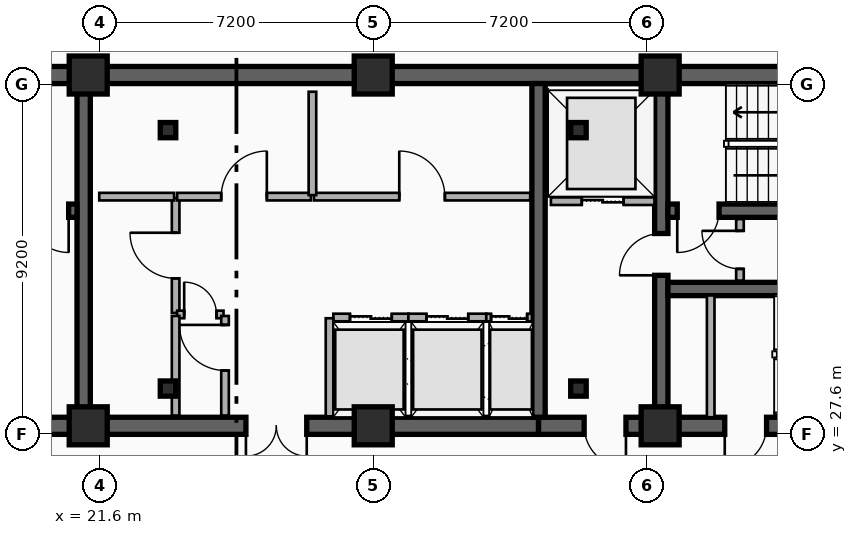
"""IFC4 building model, lengths in metres.
Left out: names, types, materials, properties, quantities, classifications, styles, units other than length and angle.
Written with IfcOpenShell. Run it as: python <this file> out.ifc"""

import sys

from ifc_helpers import new_model, si_unit, direction, frame, frame_2d, origin, origin_2d, place, context, subcontext, project, spatial, rectangle, i_section, extrude, element, fill, save


model = new_model("IFC4")
c1 = context("Model", 3, precision=1e-05, world=origin(), true_north=direction((0.0, 1.0)))
c2 = subcontext(c1, "Body", "Model", "MODEL_VIEW")
j1 = project(units=[si_unit("LENGTHUNIT", "METRE"), si_unit("PLANEANGLEUNIT", "RADIAN")], contexts=[c1])
p1 = place(None, origin())
s1 = spatial("IfcSite", under=j1, at=p1, CompositionType="ELEMENT")
p2 = place(p1, origin())
s2 = spatial("IfcBuilding", under=s1, at=p2, CompositionType="ELEMENT")
p3 = place(p2, frame((0.0, 0.0, 229.2)))
s3 = spatial("IfcBuildingStorey", under=s2, at=p3, CompositionType="ELEMENT", Elevation=229.2)
p4 = place(p3, frame((12.15, 37.05, 0.0), z_axis=(0.0, 0.0, 1.0), x_axis=(1.0, 0.0, 0.0)))
e1 = element("IfcWall", 1, at=p4, inside=s3, PredefinedType="SHEAR", context=c2, shape_type="SweptSolid", body=[
    extrude(rectangle(XDim=33.23, YDim=0.45, at=frame_2d((16.615, 0.0))), origin(), (0.0, 0.0, 1.0), 3.6),
])
p5 = place(p3, frame((21.18, 27.82, 0.0), z_axis=(0.0, 0.0, 1.0), x_axis=(-1.0, 0.0, 0.0)))
e2 = element("IfcWall", 2, at=p5, inside=s3, PredefinedType="SHEAR", context=c2, shape_type="SweptSolid", body=[
    extrude(rectangle(XDim=9.03, YDim=0.45, at=frame_2d((4.515, 0.0))), origin(), (0.0, 0.0, 1.0), 3.6),
])
p6 = place(p5, frame((2.68, 0.0, 0.0)))
e3 = element("IfcOpeningElement", 3, at=p6, cuts=e2, PredefinedType="OPENING", context=c2, shape_type="SweptSolid", body=[
    extrude(rectangle(XDim=1.1, YDim=2.15, at=frame_2d((0.55, 1.075))), frame((0.0, 0.235, 0.0), z_axis=(0.0, -1.0, 0.0), x_axis=(1.0, 0.0, 0.0)), (0.0, 0.0, 1.0), 0.47),
])
p7 = place(p3, frame((33.15, 27.82, 0.0), z_axis=(0.0, 0.0, 1.0), x_axis=(-1.0, 0.0, 0.0)))
e4 = element("IfcWall", 4, at=p7, inside=s3, PredefinedType="SHEAR", context=c2, shape_type="SweptSolid", body=[
    extrude(rectangle(XDim=11.97, YDim=0.45, at=frame_2d((5.985, 0.0))), origin(), (0.0, 0.0, 1.0), 3.6),
])
p8 = place(p7, frame((6.1, 0.0, 0.0)))
e5 = element("IfcOpeningElement", 5, at=p8, cuts=e4, PredefinedType="OPENING", context=c2, shape_type="SweptSolid", body=[
    extrude(rectangle(XDim=1.6, YDim=2.2, at=frame_2d((0.8, 1.1))), frame((0.0, 0.235, 0.0), z_axis=(0.0, -1.0, 0.0), x_axis=(1.0, 0.0, 0.0)), (0.0, 0.0, 1.0), 0.47),
])
p9 = place(p3, frame((45.38, 27.82, 0.0), z_axis=(0.0, 0.0, 1.0), x_axis=(-1.0, 0.0, 0.0)))
e6 = element("IfcWall", 6, at=p9, inside=s3, PredefinedType="SHEAR", context=c2, shape_type="SweptSolid", body=[
    extrude(rectangle(XDim=12.23, YDim=0.45, at=frame_2d((6.115, 0.0))), origin(), (0.0, 0.0, 1.0), 3.6),
])
p10 = place(p9, frame((9.93, 0.0, 0.0)))
e7 = element("IfcOpeningElement", 7, at=p10, cuts=e6, PredefinedType="OPENING", context=c2, shape_type="SweptSolid", body=[
    extrude(rectangle(XDim=1.1, YDim=2.15, at=frame_2d((0.55, 1.075))), frame((0.0, 0.235, 0.0), z_axis=(0.0, -1.0, 0.0), x_axis=(1.0, 0.0, 0.0)), (0.0, 0.0, 1.0), 0.47),
])
p11 = place(p9, frame((6.23, 0.0, 0.0)))
e8 = element("IfcOpeningElement", 8, at=p11, cuts=e6, PredefinedType="OPENING", context=c2, shape_type="SweptSolid", body=[
    extrude(rectangle(XDim=1.1, YDim=2.15, at=frame_2d((0.55, 1.075))), frame((0.0, 0.235, 0.0), z_axis=(0.0, -1.0, 0.0), x_axis=(1.0, 0.0, 0.0)), (0.0, 0.0, 1.0), 0.47),
])
for number, where, z_axis, x_axis in (
    (9, (21.18, 28.045, 0.0), (0.0, 0.0, 1.0), (0.0, 1.0, 0.0)),
    (10, (33.15, 28.045, 0.0), (0.0, 0.0, 1.0), (0.0, 1.0, 0.0)),
):
    element("IfcWall", number, at=place(p3, frame(where, z_axis=z_axis, x_axis=x_axis)), inside=s3, PredefinedType="SHEAR", context=c2, shape_type="SweptSolid", body=[
        extrude(rectangle(XDim=8.78, YDim=0.35, at=frame_2d((4.39, 0.0))), origin(), (0.0, 0.0, 1.0), 3.6),
    ])
p12 = place(p3, frame((36.38, 28.045, 0.0), z_axis=(0.0, 0.0, 1.0), x_axis=(0.0, 1.0, 0.0)))
e11 = element("IfcWall", 11, at=p12, inside=s3, PredefinedType="SHEAR", context=c2, shape_type="SweptSolid", body=[
    extrude(rectangle(XDim=8.78, YDim=0.35, at=frame_2d((4.39, 0.0))), origin(), (0.0, 0.0, 1.0), 3.6),
])
p13 = place(p12, frame((3.735, 0.0, 0.0)))
e12 = element("IfcOpeningElement", 12, at=p13, cuts=e11, PredefinedType="OPENING", context=c2, shape_type="SweptSolid", body=[
    extrude(rectangle(XDim=1.1, YDim=2.15, at=frame_2d((0.55, 1.075))), frame((0.0, 0.185, 0.0), z_axis=(0.0, -1.0, 0.0), x_axis=(1.0, 0.0, 0.0)), (0.0, 0.0, 1.0), 0.37),
])
p14 = place(p3, frame((21.005, 33.48, 0.0), z_axis=(0.0, 0.0, 1.0), x_axis=(-1.0, 0.0, 0.0)))
e13 = element("IfcWall", 13, at=p14, inside=s3, PredefinedType="SHEAR", context=c2, shape_type="SweptSolid", body=[
    extrude(rectangle(XDim=8.63, YDim=0.35, at=frame_2d((4.315, 0.0))), origin(), (0.0, 0.0, 1.0), 3.6),
])
p15 = place(p14, frame((0.22, 0.0, 0.0)))
e14 = element("IfcOpeningElement", 14, at=p15, cuts=e13, PredefinedType="OPENING", context=c2, shape_type="SweptSolid", body=[
    extrude(rectangle(XDim=1.1, YDim=2.15, at=frame_2d((0.55, 1.075))), frame((0.0, 0.185, 0.0), z_axis=(0.0, -1.0, 0.0), x_axis=(1.0, 0.0, 0.0)), (0.0, 0.0, 1.0), 0.37),
])
p16 = place(p3, frame((45.155, 33.48, 0.0), z_axis=(0.0, 0.0, 1.0), x_axis=(-1.0, 0.0, 0.0)))
e15 = element("IfcWall", 15, at=p16, inside=s3, PredefinedType="SHEAR", context=c2, shape_type="SweptSolid", body=[
    extrude(rectangle(XDim=8.6, YDim=0.35, at=frame_2d((4.3, 0.0))), origin(), (0.0, 0.0, 1.0), 3.6),
])
p17 = place(p16, frame((7.255, 0.0, 0.0)))
e16 = element("IfcOpeningElement", 16, at=p17, cuts=e15, PredefinedType="OPENING", context=c2, shape_type="SweptSolid", body=[
    extrude(rectangle(XDim=1.1, YDim=2.15, at=frame_2d((0.55, 1.075))), frame((0.0, 0.185, 0.0), z_axis=(0.0, -1.0, 0.0), x_axis=(1.0, 0.0, 0.0)), (0.0, 0.0, 1.0), 0.37),
])
p18 = place(p3, frame((36.555, 31.42, 0.0), z_axis=(0.0, 0.0, 1.0), x_axis=(1.0, 0.0, 0.0)))
e17 = element("IfcWall", 17, at=p18, inside=s3, PredefinedType="SHEAR", context=c2, shape_type="SweptSolid", body=[
    extrude(rectangle(XDim=8.6, YDim=0.35, at=frame_2d((4.3, 0.0))), origin(), (0.0, 0.0, 1.0), 3.6),
])
for number, where, z_axis, x_axis in (
    (18, (23.4, 28.8, 0.0), (0.0, 0.0, 1.0), (1.0, 0.0, 0.0)),
    (19, (34.2, 28.8, 0.0), (0.0, 0.0, 1.0), (1.0, 0.0, 0.0)),
    (20, (34.2, 35.6, 0.0), (0.0, 0.0, 1.0), (1.0, 0.0, 0.0)),
    (21, (23.4, 35.6, 0.0), (0.0, 0.0, 1.0), (1.0, 0.0, 0.0)),
):
    element("IfcColumn", number, at=place(p3, frame(where, z_axis=z_axis, x_axis=x_axis)), inside=s3, PredefinedType="COLUMN", context=c2, shape_type="SweptSolid", body=[
        extrude(i_section(OverallWidth=0.408, OverallDepth=0.4, WebThickness=0.025, FlangeThickness=0.039, FilletRadius=0.015, at=origin_2d()), origin(), (0.0, 0.0, 1.0), 3.6),
    ])
for number, where, z_axis, x_axis in (
    (22, (21.3, 27.82, 0.0), (0.0, 0.0, 1.0), (1.0, 0.0, 0.0)),
    (23, (21.3, 37.05, 0.0), (0.0, 0.0, 1.0), (1.0, 0.0, 0.0)),
    (24, (28.8, 27.82, 0.0), (0.0, 0.0, 1.0), (1.0, 0.0, 0.0)),
    (25, (28.8, 37.05, 0.0), (0.0, 0.0, 1.0), (1.0, 0.0, 0.0)),
    (26, (36.35, 27.82, 0.0), (0.0, 0.0, 1.0), (1.0, 0.0, 0.0)),
    (27, (36.35, 37.05, 0.0), (0.0, 0.0, 1.0), (1.0, 0.0, 0.0)),
):
    element("IfcColumn", number, at=place(p3, frame(where, z_axis=z_axis, x_axis=x_axis)), inside=s3, PredefinedType="COLUMN", context=c2, shape_type="SweptSolid", body=[
        extrude(rectangle(XDim=1.0, YDim=1.0, at=origin_2d()), origin(), (0.0, 0.0, 1.0), 3.6),
    ])
p19 = place(p3, frame((33.475, 33.73, 0.0), z_axis=(0.0, 0.0, 1.0), x_axis=(1.0, 0.0, 0.0)))
e28 = element("IfcWall", 28, at=p19, inside=s3, PredefinedType="PARTITIONING", context=c2, shape_type="SweptSolid", body=[
    extrude(rectangle(XDim=2.725, YDim=0.2, at=frame_2d((1.362, 0.0))), origin(), (0.0, 0.0, 1.0), 2.41),
])
p20 = place(p19, frame((0.812, 0.0, 0.0)))
e29 = element("IfcOpeningElement", 29, at=p20, cuts=e28, PredefinedType="OPENING", context=c2, shape_type="SweptSolid", body=[
    extrude(rectangle(XDim=1.1, YDim=2.15, at=frame_2d((0.55, 1.075))), frame((0.0, 0.11, 0.0), z_axis=(0.0, -1.0, 0.0), x_axis=(1.0, 0.0, 0.0)), (0.0, 0.0, 1.0), 0.22),
])
p21 = place(p3, frame((27.75, 30.67, 0.0), z_axis=(0.0, 0.0, 1.0), x_axis=(1.0, 0.0, 0.0)))
e30 = element("IfcWall", 30, at=p21, inside=s3, PredefinedType="PARTITIONING", context=c2, shape_type="SweptSolid", body=[
    extrude(rectangle(XDim=1.975, YDim=0.2, at=frame_2d((0.988, 0.0))), origin(), (0.0, 0.0, 1.0), 2.41),
])
p22 = place(p21, frame((0.438, 0.0, 0.0)))
e31 = element("IfcOpeningElement", 31, at=p22, cuts=e30, PredefinedType="OPENING", context=c2, shape_type="SweptSolid", body=[
    extrude(rectangle(XDim=1.1, YDim=2.15, at=frame_2d((0.55, 1.075))), frame((0.0, 0.11, 0.0), z_axis=(0.0, -1.0, 0.0), x_axis=(1.0, 0.0, 0.0)), (0.0, 0.0, 1.0), 0.22),
])
p23 = place(p3, frame((27.65, 28.07, 0.0), z_axis=(0.0, 0.0, 1.0), x_axis=(0.0, 1.0, 0.0)))
e32 = element("IfcWall", 32, at=p23, inside=s3, PredefinedType="PARTITIONING", context=c2, shape_type="SweptSolid", body=[
    extrude(rectangle(XDim=2.58, YDim=0.2, at=frame_2d((1.29, 0.0))), origin(), (0.0, 0.0, 1.0), 2.41),
])
p24 = place(p3, frame((29.725, 30.67, 0.0), z_axis=(0.0, 0.0, 1.0), x_axis=(1.0, 0.0, 0.0)))
e33 = element("IfcWall", 33, at=p24, inside=s3, PredefinedType="PARTITIONING", context=c2, shape_type="SweptSolid", body=[
    extrude(rectangle(XDim=2.05, YDim=0.2, at=frame_2d((1.025, 0.0))), origin(), (0.0, 0.0, 1.0), 2.72),
])
p25 = place(p24, frame((0.475, 0.0, 0.0)))
e34 = element("IfcOpeningElement", 34, at=p25, cuts=e33, PredefinedType="OPENING", context=c2, shape_type="SweptSolid", body=[
    extrude(rectangle(XDim=1.1, YDim=2.15, at=frame_2d((0.55, 1.075))), frame((0.0, 0.11, 0.0), z_axis=(0.0, -1.0, 0.0), x_axis=(1.0, 0.0, 0.0)), (0.0, 0.0, 1.0), 0.22),
])
p26 = place(p3, frame((31.775, 30.67, 0.0), z_axis=(0.0, 0.0, 1.0), x_axis=(1.0, 0.0, 0.0)))
e35 = element("IfcWall", 35, at=p26, inside=s3, PredefinedType="PARTITIONING", context=c2, shape_type="SweptSolid", body=[
    extrude(rectangle(XDim=1.2, YDim=0.2, at=frame_2d((0.6, 0.0))), origin(), (0.0, 0.0, 1.0), 2.72),
])
p27 = place(p26, frame((0.125, 0.0, 0.0)))
e36 = element("IfcOpeningElement", 36, at=p27, cuts=e35, PredefinedType="OPENING", context=c2, shape_type="SweptSolid", body=[
    extrude(rectangle(XDim=0.95, YDim=2.15, at=frame_2d((0.475, 1.075))), frame((0.0, 0.11, 0.0), z_axis=(0.0, -1.0, 0.0), x_axis=(1.0, 0.0, 0.0)), (0.0, 0.0, 1.0), 0.22),
])
p28 = place(p3, frame((37.68, 28.045, 0.0), z_axis=(0.0, 0.0, 1.0), x_axis=(0.0, 1.0, 0.0)))
e37 = element("IfcWall", 37, at=p28, inside=s3, PredefinedType="PARTITIONING", context=c2, shape_type="SweptSolid", body=[
    extrude(rectangle(XDim=3.205, YDim=0.2, at=frame_2d((1.603, 0.0))), origin(), (0.0, 0.0, 1.0), 2.72),
])
p29 = place(p3, frame((38.45, 31.64, 0.0), z_axis=(0.0, 0.0, 1.0), x_axis=(0.0, 1.0, 0.0)))
e38 = element("IfcWall", 38, at=p29, inside=s3, PredefinedType="PARTITIONING", context=c2, shape_type="SweptSolid", body=[
    extrude(rectangle(XDim=1.62, YDim=0.2, at=frame_2d((0.81, 0.0))), origin(), (0.0, 0.0, 1.0), 3.34),
])
p30 = place(p29, frame((0.31, 0.0, 0.0)))
e39 = element("IfcOpeningElement", 39, at=p30, cuts=e38, PredefinedType="OPENING", context=c2, shape_type="SweptSolid", body=[
    extrude(rectangle(XDim=1.0, YDim=2.15, at=frame_2d((0.5, 1.075))), frame((0.0, 0.11, 0.0), z_axis=(0.0, -1.0, 0.0), x_axis=(1.0, 0.0, 0.0)), (0.0, 0.0, 1.0), 0.22),
])
p31 = place(p3, frame((23.6, 30.79, 0.0), z_axis=(0.0, 0.0, 1.0), x_axis=(0.0, 1.0, 0.0)))
e40 = element("IfcWall", 40, at=p31, inside=s3, PredefinedType="PARTITIONING", context=c2, shape_type="SweptSolid", body=[
    extrude(rectangle(XDim=3.02, YDim=0.2, at=frame_2d((1.51, 0.0))), origin(), (0.0, 0.0, 1.0), 3.34),
])
p32 = place(p31, frame((0.91, 0.0, 0.0)))
e41 = element("IfcOpeningElement", 41, at=p32, cuts=e40, PredefinedType="OPENING", context=c2, shape_type="SweptSolid", body=[
    extrude(rectangle(XDim=1.2, YDim=2.15, at=frame_2d((0.6, 1.075))), frame((0.0, 0.11, 0.0), z_axis=(0.0, -1.0, 0.0), x_axis=(1.0, 0.0, 0.0)), (0.0, 0.0, 1.0), 0.22),
])
p33 = place(p3, frame((23.64, 30.75, 0.0), z_axis=(0.0, 0.0, 1.0), x_axis=(1.0, 0.0, 0.0)))
e42 = element("IfcWall", 42, at=p33, inside=s3, PredefinedType="PARTITIONING", context=c2, shape_type="SweptSolid", body=[
    extrude(rectangle(XDim=1.22, YDim=0.2, at=frame_2d((0.61, 0.0))), origin(), (0.0, 0.0, 1.0), 3.34),
])
p34 = place(p33, frame((0.185, 0.0, 0.0)))
e43 = element("IfcOpeningElement", 43, at=p34, cuts=e42, PredefinedType="OPENING", context=c2, shape_type="SweptSolid", body=[
    extrude(rectangle(XDim=0.85, YDim=2.1, at=frame_2d((0.425, 1.05))), frame((0.0, 0.11, 0.0), z_axis=(0.0, -1.0, 0.0), x_axis=(1.0, 0.0, 0.0)), (0.0, 0.0, 1.0), 0.22),
])
p35 = place(p3, frame((23.64, 33.85, 0.0), z_axis=(0.0, 0.0, 1.0), x_axis=(1.0, 0.0, 0.0)))
e44 = element("IfcWall", 44, at=p35, inside=s3, PredefinedType="PARTITIONING", context=c2, shape_type="SweptSolid", body=[
    extrude(rectangle(XDim=3.52, YDim=0.2, at=frame_2d((1.76, 0.0))), origin(), (0.0, 0.0, 1.0), 3.34),
])
p36 = place(p35, frame((1.16, 0.0, 0.0)))
e45 = element("IfcOpeningElement", 45, at=p36, cuts=e44, PredefinedType="OPENING", context=c2, shape_type="SweptSolid", body=[
    extrude(rectangle(XDim=1.2, YDim=2.15, at=frame_2d((0.6, 1.075))), frame((0.0, 0.11, 0.0), z_axis=(0.0, -1.0, 0.0), x_axis=(1.0, 0.0, 0.0)), (0.0, 0.0, 1.0), 0.22),
])
p37 = place(p3, frame((27.24, 33.85, 0.0), z_axis=(0.0, 0.0, 1.0), x_axis=(1.0, 0.0, 0.0)))
e46 = element("IfcWall", 46, at=p37, inside=s3, PredefinedType="PARTITIONING", context=c2, shape_type="SweptSolid", body=[
    extrude(rectangle(XDim=5.69, YDim=0.2, at=frame_2d((2.845, 0.0))), origin(), (0.0, 0.0, 1.0), 2.41),
])
p38 = place(p37, frame((2.245, 0.0, 0.0)))
e47 = element("IfcOpeningElement", 47, at=p38, cuts=e46, PredefinedType="OPENING", context=c2, shape_type="SweptSolid", body=[
    extrude(rectangle(XDim=1.2, YDim=2.15, at=frame_2d((0.6, 1.075))), frame((0.0, 0.11, 0.0), z_axis=(0.0, -1.0, 0.0), x_axis=(1.0, 0.0, 0.0)), (0.0, 0.0, 1.0), 0.22),
])
p39 = place(p3, frame((24.9, 28.09, 0.0), z_axis=(0.0, 0.0, 1.0), x_axis=(0.0, 1.0, 0.0)))
e48 = element("IfcWall", 48, at=p39, inside=s3, PredefinedType="PARTITIONING", context=c2, shape_type="SweptSolid", body=[
    extrude(rectangle(XDim=2.62, YDim=0.2, at=frame_2d((1.31, 0.0))), origin(), (0.0, 0.0, 1.0), 2.72),
])
p40 = place(p39, frame((1.185, 0.0, 0.0)))
e49 = element("IfcOpeningElement", 49, at=p40, cuts=e48, PredefinedType="OPENING", context=c2, shape_type="SweptSolid", body=[
    extrude(rectangle(XDim=1.2, YDim=2.15, at=frame_2d((0.6, 1.075))), frame((0.0, 0.11, 0.0), z_axis=(0.0, -1.0, 0.0), x_axis=(1.0, 0.0, 0.0)), (0.0, 0.0, 1.0), 0.22),
])
p41 = place(p3, frame((23.6, 28.09, 0.0), z_axis=(0.0, 0.0, 1.0), x_axis=(0.0, 1.0, 0.0)))
e50 = element("IfcWall", 50, at=p41, inside=s3, PredefinedType="PARTITIONING", context=c2, shape_type="SweptSolid", body=[
    extrude(rectangle(XDim=2.62, YDim=0.2, at=frame_2d((1.31, 0.0))), origin(), (0.0, 0.0, 1.0), 2.72),
])
p42 = place(p3, frame((21.59, 33.85, 0.0), z_axis=(0.0, 0.0, 1.0), x_axis=(1.0, 0.0, 0.0)))
e51 = element("IfcWall", 51, at=p42, inside=s3, PredefinedType="PARTITIONING", context=c2, shape_type="SweptSolid", body=[
    extrude(rectangle(XDim=1.97, YDim=0.2, at=frame_2d((0.985, 0.0))), origin(), (0.0, 0.0, 1.0), 2.41),
])
p43 = place(p3, frame((27.2, 33.89, 0.0), z_axis=(0.0, 0.0, 1.0), x_axis=(0.0, 1.0, 0.0)))
e52 = element("IfcWall", 52, at=p43, inside=s3, PredefinedType="PARTITIONING", context=c2, shape_type="SweptSolid", body=[
    extrude(rectangle(XDim=2.72, YDim=0.2, at=frame_2d((1.36, 0.0))), origin(), (0.0, 0.0, 1.0), 3.34),
])
p44 = place(p20, origin())
e53 = element("IfcDoor", 53, at=p44, inside=s3, OperationType="DOUBLE_DOOR_SLIDING", PredefinedType="DOOR", context=c2, shape_type="SweptSolid", body=[
    extrude(rectangle(XDim=1.1, YDim=2.15, at=frame_2d((0.55, 1.075))), frame((0.0, 0.025, 0.0), z_axis=(0.0, -1.0, 0.0), x_axis=(1.0, 0.0, 0.0)), (0.0, 0.0, 1.0), 0.05),
])
fill(e29, e53)
p45 = place(p22, origin())
e54 = element("IfcDoor", 54, at=p45, inside=s3, OperationType="DOUBLE_DOOR_SLIDING", PredefinedType="DOOR", context=c2, shape_type="SweptSolid", body=[
    extrude(rectangle(XDim=1.1, YDim=2.15, at=frame_2d((0.55, 1.075))), frame((0.0, 0.025, 0.0), z_axis=(0.0, -1.0, 0.0), x_axis=(1.0, 0.0, 0.0)), (0.0, 0.0, 1.0), 0.05),
])
fill(e31, e54)
p46 = place(p25, origin())
e55 = element("IfcDoor", 55, at=p46, inside=s3, OperationType="DOUBLE_DOOR_SLIDING", PredefinedType="DOOR", context=c2, shape_type="SweptSolid", body=[
    extrude(rectangle(XDim=1.1, YDim=2.15, at=frame_2d((0.55, 1.075))), frame((0.0, 0.025, 0.0), z_axis=(0.0, -1.0, 0.0), x_axis=(1.0, 0.0, 0.0)), (0.0, 0.0, 1.0), 0.05),
])
fill(e34, e55)
p47 = place(p27, origin())
e56 = element("IfcDoor", 56, at=p47, inside=s3, OperationType="DOUBLE_DOOR_SLIDING", PredefinedType="DOOR", context=c2, shape_type="SweptSolid", body=[
    extrude(rectangle(XDim=0.95, YDim=2.15, at=frame_2d((0.475, 1.075))), frame((0.0, 0.025, 0.0), z_axis=(0.0, -1.0, 0.0), x_axis=(1.0, 0.0, 0.0)), (0.0, 0.0, 1.0), 0.05),
])
fill(e36, e56)
p48 = place(p15, origin())
e57 = element("IfcDoor", 57, at=p48, inside=s3, OperationType="SINGLE_SWING_LEFT", PredefinedType="DOOR", context=c2, shape_type="SweptSolid", body=[
    extrude(rectangle(XDim=1.1, YDim=2.15, at=frame_2d((0.55, 1.075))), frame((0.0, 0.025, 0.0), z_axis=(0.0, -1.0, 0.0), x_axis=(1.0, 0.0, 0.0)), (0.0, 0.0, 1.0), 0.05),
])
fill(e14, e57)
p49 = place(p17, origin())
e58 = element("IfcDoor", 58, at=p49, inside=s3, OperationType="SINGLE_SWING_RIGHT", PredefinedType="DOOR", context=c2, shape_type="SweptSolid", body=[
    extrude(rectangle(XDim=1.1, YDim=2.15, at=frame_2d((0.55, 1.075))), frame((0.0, 0.025, 0.0), z_axis=(0.0, -1.0, 0.0), x_axis=(1.0, 0.0, 0.0)), (0.0, 0.0, 1.0), 0.05),
])
fill(e16, e58)
p50 = place(p13, origin())
e59 = element("IfcDoor", 59, at=p50, inside=s3, OperationType="SINGLE_SWING_LEFT", PredefinedType="DOOR", context=c2, shape_type="SweptSolid", body=[
    extrude(rectangle(XDim=1.1, YDim=2.15, at=frame_2d((0.55, 1.075))), frame((0.0, 0.025, 0.0), z_axis=(0.0, -1.0, 0.0), x_axis=(1.0, 0.0, 0.0)), (0.0, 0.0, 1.0), 0.05),
])
fill(e12, e59)
p51 = place(p10, origin())
e60 = element("IfcDoor", 60, at=p51, inside=s3, OperationType="SINGLE_SWING_LEFT", PredefinedType="DOOR", context=c2, shape_type="SweptSolid", body=[
    extrude(rectangle(XDim=1.1, YDim=2.15, at=frame_2d((0.55, 1.075))), frame((0.0, 0.025, 0.0), z_axis=(0.0, -1.0, 0.0), x_axis=(1.0, 0.0, 0.0)), (0.0, 0.0, 1.0), 0.05),
])
fill(e7, e60)
p52 = place(p11, origin())
e61 = element("IfcDoor", 61, at=p52, inside=s3, OperationType="SINGLE_SWING_RIGHT", PredefinedType="DOOR", context=c2, shape_type="SweptSolid", body=[
    extrude(rectangle(XDim=1.1, YDim=2.15, at=frame_2d((0.55, 1.075))), frame((0.0, 0.025, 0.0), z_axis=(0.0, -1.0, 0.0), x_axis=(1.0, 0.0, 0.0)), (0.0, 0.0, 1.0), 0.05),
])
fill(e8, e61)
p53 = place(p8, origin())
e62 = element("IfcDoor", 62, at=p53, inside=s3, OperationType="SINGLE_SWING_LEFT", PredefinedType="DOOR", context=c2, shape_type="SweptSolid", body=[
    extrude(rectangle(XDim=1.6, YDim=2.2, at=frame_2d((0.8, 1.1))), frame((0.0, 0.025, 0.0), z_axis=(0.0, -1.0, 0.0), x_axis=(1.0, 0.0, 0.0)), (0.0, 0.0, 1.0), 0.05),
])
fill(e5, e62)
p54 = place(p30, origin())
e63 = element("IfcDoor", 63, at=p54, inside=s3, OperationType="SINGLE_SWING_RIGHT", PredefinedType="DOOR", context=c2, shape_type="SweptSolid", body=[
    extrude(rectangle(XDim=1.0, YDim=2.15, at=frame_2d((0.5, 1.075))), frame((0.0, 0.025, 0.0), z_axis=(0.0, -1.0, 0.0), x_axis=(1.0, 0.0, 0.0)), (0.0, 0.0, 1.0), 0.05),
])
fill(e39, e63)
p55 = place(p32, origin())
e64 = element("IfcDoor", 64, at=p55, inside=s3, OperationType="SINGLE_SWING_RIGHT", PredefinedType="DOOR", context=c2, shape_type="SweptSolid", body=[
    extrude(rectangle(XDim=1.2, YDim=2.15, at=frame_2d((0.6, 1.075))), frame((0.0, 0.025, 0.0), z_axis=(0.0, -1.0, 0.0), x_axis=(1.0, 0.0, 0.0)), (0.0, 0.0, 1.0), 0.05),
])
fill(e41, e64)
p56 = place(p34, origin())
e65 = element("IfcDoor", 65, at=p56, inside=s3, OperationType="SINGLE_SWING_LEFT", PredefinedType="DOOR", context=c2, shape_type="SweptSolid", body=[
    extrude(rectangle(XDim=0.85, YDim=2.1, at=frame_2d((0.425, 1.05))), frame((0.0, 0.025, 0.0), z_axis=(0.0, -1.0, 0.0), x_axis=(1.0, 0.0, 0.0)), (0.0, 0.0, 1.0), 0.05),
])
fill(e43, e65)
p57 = place(p36, origin())
e66 = element("IfcDoor", 66, at=p57, inside=s3, OperationType="SINGLE_SWING_RIGHT", PredefinedType="DOOR", context=c2, shape_type="SweptSolid", body=[
    extrude(rectangle(XDim=1.2, YDim=2.15, at=frame_2d((0.6, 1.075))), frame((0.0, 0.025, 0.0), z_axis=(0.0, -1.0, 0.0), x_axis=(1.0, 0.0, 0.0)), (0.0, 0.0, 1.0), 0.05),
])
fill(e45, e66)
p58 = place(p38, origin())
e67 = element("IfcDoor", 67, at=p58, inside=s3, OperationType="SINGLE_SWING_LEFT", PredefinedType="DOOR", context=c2, shape_type="SweptSolid", body=[
    extrude(rectangle(XDim=1.2, YDim=2.15, at=frame_2d((0.6, 1.075))), frame((0.0, 0.025, 0.0), z_axis=(0.0, -1.0, 0.0), x_axis=(1.0, 0.0, 0.0)), (0.0, 0.0, 1.0), 0.05),
])
fill(e47, e67)
p59 = place(p40, origin())
e68 = element("IfcDoor", 68, at=p59, inside=s3, OperationType="SINGLE_SWING_RIGHT", PredefinedType="DOOR", context=c2, shape_type="SweptSolid", body=[
    extrude(rectangle(XDim=1.2, YDim=2.15, at=frame_2d((0.6, 1.075))), frame((0.0, 0.025, 0.0), z_axis=(0.0, -1.0, 0.0), x_axis=(1.0, 0.0, 0.0)), (0.0, 0.0, 1.0), 0.05),
])
fill(e49, e68)
save(model, sys.argv[1])
